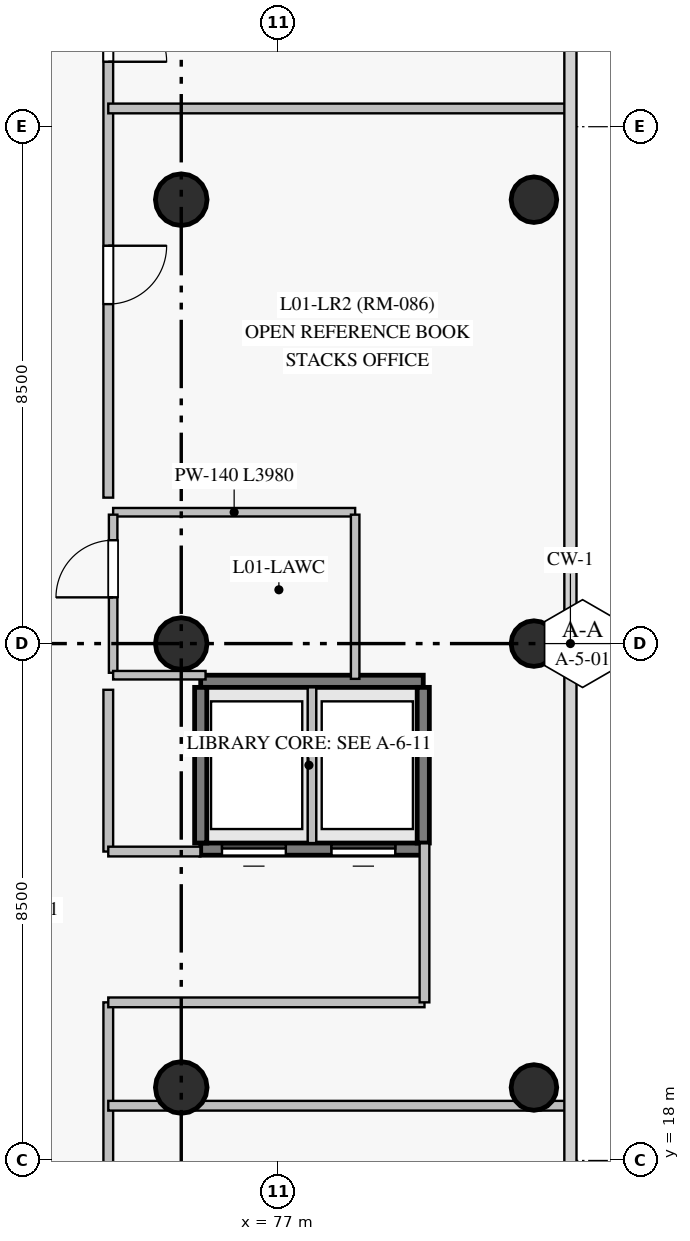
"""IFC4 building model, lengths in metres.
Left out: names, types, materials, properties, quantities, classifications, styles, units other than length and angle.
Written with IfcOpenShell. Run it as: python <this file> out.ifc"""

import sys

from ifc_helpers import new_model, si_unit, direction, frame, frame_2d, origin, origin_with_axes, origin_2d, place, context, subcontext, project, spatial, rectangle, circle, extrude, source, transform, mapped, element, fill, save


model = new_model("IFC4")
c1 = context("Model", 3, precision=1e-05, world=origin(), true_north=direction((0.0, 1.0)))
c2 = subcontext(c1, "Body", "Model", "MODEL_VIEW")
j1 = project(units=[si_unit("LENGTHUNIT", "METRE"), si_unit("PLANEANGLEUNIT", "RADIAN")], contexts=[c1])
p1 = place(None, origin())
s1 = spatial("IfcSite", under=j1, at=p1, CompositionType="ELEMENT")
p2 = place(p1, origin())
s2 = spatial("IfcBuilding", under=s1, at=p2, CompositionType="ELEMENT")
p3 = place(p2, frame((0.0, 0.0, 4.5)))
s3 = spatial("IfcBuildingStorey", under=s2, at=p3, CompositionType="ELEMENT", Elevation=4.5)
m1 = source(origin_with_axes(), c2, "Body", "SweptSolid", [
    extrude(circle(Radius=0.425, at=origin_2d()), origin(), (0.0, 0.0, 1.0), 4.5),
])
for number, where, z_axis, x_axis in (
    (1, (75.4, 19.2, 0.0), (0.0, 0.0, 1.0), (1.0, 0.0, 0.0)),
    (2, (75.4, 26.5, 0.0), (0.0, 0.0, 1.0), (1.0, 0.0, 0.0)),
    (3, (75.4, 33.8, 0.0), (0.0, 0.0, 1.0), (1.0, 0.0, 0.0)),
):
    element("IfcColumn", number, at=place(p3, frame(where, z_axis=z_axis, x_axis=x_axis)), inside=s3, PredefinedType="COLUMN", context=c2, shape_type="MappedRepresentation", body=[
        mapped(m1, transform((0.0, 0.0, 0.0), scale=1.0)),
    ])
m2 = source(origin_with_axes(), c2, "Body", "SweptSolid", [
    extrude(circle(Radius=0.375, at=origin_2d()), origin(), (0.0, 0.0, 1.0), 4.5),
])
for number, where, z_axis, x_axis in (
    (4, (81.2, 19.2, 0.0), (0.0, 0.0, 1.0), (1.0, 0.0, 0.0)),
    (5, (81.2, 26.5, 0.0), (0.0, 0.0, 1.0), (1.0, 0.0, 0.0)),
    (6, (81.2, 33.8, 0.0), (0.0, 0.0, 1.0), (1.0, 0.0, 0.0)),
):
    element("IfcColumn", number, at=place(p3, frame(where, z_axis=z_axis, x_axis=x_axis)), inside=s3, PredefinedType="COLUMN", context=c2, shape_type="MappedRepresentation", body=[
        mapped(m2, transform((0.0, 0.0, 0.0), scale=1.0)),
    ])
p4 = place(p3, frame((75.72, 23.12, 0.0), z_axis=(0.0, 0.0, 1.0), x_axis=(1.0, 0.0, 0.0)))
e7 = element("IfcWall", 7, at=p4, inside=s3, PredefinedType="SHEAR", context=c2, shape_type="SweptSolid", body=[
    extrude(rectangle(XDim=3.66, YDim=0.2, at=frame_2d((1.83, 0.0))), origin(), (0.0, 0.0, 1.0), 4.2),
])
p5 = place(p4, frame((0.35, 0.0, 0.0)))
e8 = element("IfcOpeningElement", 8, at=p5, cuts=e7, PredefinedType="OPENING", context=c2, shape_type="SweptSolid", body=[
    extrude(rectangle(XDim=1.05, YDim=2.15, at=frame_2d((0.525, 1.075))), frame((0.0, 0.11, 0.0), z_axis=(0.0, -1.0, 0.0), x_axis=(1.0, 0.0, 0.0)), (0.0, 0.0, 1.0), 0.22),
])
p6 = place(p4, frame((2.15, 0.0, 0.0)))
e9 = element("IfcOpeningElement", 9, at=p6, cuts=e7, PredefinedType="OPENING", context=c2, shape_type="SweptSolid", body=[
    extrude(rectangle(XDim=1.05, YDim=2.15, at=frame_2d((0.525, 1.075))), frame((0.0, 0.11, 0.0), z_axis=(0.0, -1.0, 0.0), x_axis=(1.0, 0.0, 0.0)), (0.0, 0.0, 1.0), 0.22),
])
p7 = place(p3, frame((75.72, 25.88, 0.0), z_axis=(0.0, 0.0, 1.0), x_axis=(1.0, 0.0, 0.0)))
e10 = element("IfcWall", 10, at=p7, inside=s3, PredefinedType="SHEAR", context=c2, shape_type="SweptSolid", body=[
    extrude(rectangle(XDim=3.66, YDim=0.2, at=frame_2d((1.83, 0.0))), origin(), (0.0, 0.0, 1.0), 4.2),
])
for number, where, z_axis, x_axis in (
    (11, (75.72, 23.22, 0.0), (0.0, 0.0, 1.0), (0.0, 1.0, 0.0)),
    (12, (79.38, 23.22, 0.0), (0.0, 0.0, 1.0), (0.0, 1.0, 0.0)),
):
    element("IfcWall", number, at=place(p3, frame(where, z_axis=z_axis, x_axis=x_axis)), inside=s3, PredefinedType="SHEAR", context=c2, shape_type="SweptSolid", body=[
        extrude(rectangle(XDim=2.56, YDim=0.2, at=frame_2d((1.28, 0.0))), origin(), (0.0, 0.0, 1.0), 4.2),
    ])
p8 = place(p3, frame((74.2, 44.038, 0.0), z_axis=(0.0, 0.0, 1.0), x_axis=(0.0, -1.0, 0.0)))
e13 = element("IfcWall", 13, at=p8, inside=s3, PredefinedType="PARTITIONING", context=c2, shape_type="SweptSolid", body=[
    extrude(rectangle(XDim=15.138, YDim=0.16, at=frame_2d((7.569, 0.0))), origin(), (0.0, 0.0, 1.0), 4.2),
])
p9 = place(p8, frame((10.996, 0.0, 0.0)))
e14 = element("IfcOpeningElement", 14, at=p9, cuts=e13, PredefinedType="OPENING", context=c2, shape_type="SweptSolid", body=[
    extrude(rectangle(XDim=0.96, YDim=2.15, at=frame_2d((0.48, 1.075))), frame((0.0, 0.09, 0.0), z_axis=(0.0, -1.0, 0.0), x_axis=(1.0, 0.0, 0.0)), (0.0, 0.0, 1.0), 0.18),
])
p10 = place(p8, frame((7.01, 0.0, 0.0)))
e15 = element("IfcOpeningElement", 15, at=p10, cuts=e13, PredefinedType="OPENING", context=c2, shape_type="SweptSolid", body=[
    extrude(rectangle(XDim=0.96, YDim=2.15, at=frame_2d((0.48, 1.075))), frame((0.0, 0.09, 0.0), z_axis=(0.0, -1.0, 0.0), x_axis=(1.0, 0.0, 0.0)), (0.0, 0.0, 1.0), 0.18),
])
p11 = place(p3, frame((74.2, 20.6, 0.0), z_axis=(0.0, 0.0, 1.0), x_axis=(0.0, -1.0, 0.0)))
e16 = element("IfcWall", 16, at=p11, inside=s3, PredefinedType="PARTITIONING", context=c2, shape_type="SweptSolid", body=[
    extrude(rectangle(XDim=11.678, YDim=0.16, at=frame_2d((5.839, 0.0))), origin(), (0.0, 0.0, 1.0), 4.2),
])
p12 = place(p11, frame((5.28, 0.0, 0.0)))
e17 = element("IfcOpeningElement", 17, at=p12, cuts=e16, PredefinedType="OPENING", context=c2, shape_type="SweptSolid", body=[
    extrude(rectangle(XDim=0.96, YDim=2.15, at=frame_2d((0.48, 1.075))), frame((0.0, 0.09, 0.0), z_axis=(0.0, -1.0, 0.0), x_axis=(1.0, 0.0, 0.0)), (0.0, 0.0, 1.0), 0.18),
])
p13 = place(p3, frame((74.2, 18.9, 0.0), z_axis=(0.0, 0.0, 1.0), x_axis=(1.0, 0.0, 0.0)))
e18 = element("IfcWall", 18, at=p13, inside=s3, PredefinedType="PARTITIONING", context=c2, shape_type="SweptSolid", body=[
    extrude(rectangle(XDim=7.545, YDim=0.16, at=frame_2d((3.772, 0.0))), origin(), (0.0, 0.0, 1.0), 3.55),
])
p14 = place(p3, frame((74.2, 35.3, 0.0), z_axis=(0.0, 0.0, 1.0), x_axis=(1.0, 0.0, 0.0)))
e19 = element("IfcWall", 19, at=p14, inside=s3, PredefinedType="PARTITIONING", context=c2, shape_type="SweptSolid", body=[
    extrude(rectangle(XDim=7.545, YDim=0.16, at=frame_2d((3.772, 0.0))), origin(), (0.0, 0.0, 1.0), 4.2),
])
p15 = place(p3, frame((79.4, 20.6, 0.0), z_axis=(0.0, 0.0, 1.0), x_axis=(-1.0, 0.0, 0.0)))
e20 = element("IfcWall", 20, at=p15, inside=s3, PredefinedType="PARTITIONING", context=c2, shape_type="SweptSolid", body=[
    extrude(rectangle(XDim=5.2, YDim=0.16, at=frame_2d((2.6, 0.0))), origin(), (0.0, 0.0, 1.0), 4.2),
])
p16 = place(p3, frame((74.28, 28.66, 0.0), z_axis=(0.0, 0.0, 1.0), x_axis=(1.0, 0.0, 0.0)))
e21 = element("IfcWall", 21, at=p16, inside=s3, PredefinedType="PARTITIONING", context=c2, shape_type="SweptSolid", body=[
    extrude(rectangle(XDim=3.98, YDim=0.14, at=frame_2d((1.99, 0.0))), origin(), (0.0, 0.0, 1.0), 4.2),
])
p17 = place(p3, frame((78.26, 25.92, 0.0), z_axis=(0.0, 0.0, 1.0), x_axis=(0.0, 1.0, 0.0)))
e22 = element("IfcWall", 22, at=p17, inside=s3, PredefinedType="PARTITIONING", context=c2, shape_type="SweptSolid", body=[
    extrude(rectangle(XDim=2.7, YDim=0.14, at=frame_2d((1.35, 0.0))), origin(), (0.0, 0.0, 1.0), 4.2),
])
p18 = place(p3, frame((74.2, 25.74, 0.0), z_axis=(0.0, 0.0, 1.0), x_axis=(0.0, -1.0, 0.0)))
e23 = element("IfcWall", 23, at=p18, inside=s3, PredefinedType="PARTITIONING", context=c2, shape_type="SweptSolid", body=[
    extrude(rectangle(XDim=2.66, YDim=0.16, at=frame_2d((1.33, 0.0))), origin(), (0.0, 0.0, 1.0), 4.2),
])
p19 = place(p3, frame((74.28, 26.02, 0.0), z_axis=(0.0, 0.0, 1.0), x_axis=(0.0, 1.0, 0.0)))
e24 = element("IfcWall", 24, at=p19, inside=s3, PredefinedType="PARTITIONING", context=c2, shape_type="SweptSolid", body=[
    extrude(rectangle(XDim=2.6, YDim=0.14, at=frame_2d((1.3, 0.0))), origin(), (0.0, 0.0, 1.0), 4.2),
])
p20 = place(p19, frame((1.24, 0.0, 0.0)))
e25 = element("IfcOpeningElement", 25, at=p20, cuts=e24, PredefinedType="OPENING", context=c2, shape_type="SweptSolid", body=[
    extrude(rectangle(XDim=0.94, YDim=2.1, at=frame_2d((0.47, 1.05))), frame((0.0, 0.08, 0.0), z_axis=(0.0, -1.0, 0.0), x_axis=(1.0, 0.0, 0.0)), (0.0, 0.0, 1.0), 0.16),
])
p21 = place(p3, frame((77.55, 23.22, 0.0), z_axis=(0.0, 0.0, 1.0), x_axis=(0.0, 1.0, 0.0)))
e26 = element("IfcWall", 26, at=p21, inside=s3, PredefinedType="PARTITIONING", context=c2, shape_type="SweptSolid", body=[
    extrude(rectangle(XDim=2.56, YDim=0.14, at=frame_2d((1.28, 0.0))), origin(), (0.0, 0.0, 1.0), 4.2),
])
p22 = place(p3, frame((79.4, 23.215, 0.0), z_axis=(0.0, 0.0, 1.0), x_axis=(0.0, -1.0, 0.0)))
e27 = element("IfcWall", 27, at=p22, inside=s3, PredefinedType="PARTITIONING", context=c2, shape_type="SweptSolid", body=[
    extrude(rectangle(XDim=2.615, YDim=0.16, at=frame_2d((1.308, 0.0))), origin(), (0.0, 0.0, 1.0), 4.2),
])
p23 = place(p3, frame((74.28, 25.98, 0.0), z_axis=(0.0, 0.0, 1.0), x_axis=(1.0, 0.0, 0.0)))
e28 = element("IfcWall", 28, at=p23, inside=s3, PredefinedType="PARTITIONING", context=c2, shape_type="SweptSolid", body=[
    extrude(rectangle(XDim=1.52, YDim=0.14, at=frame_2d((0.76, 0.0))), origin(), (0.0, 0.0, 1.0), 3.55),
])
p24 = place(p3, frame((74.2, 23.08, 0.0), z_axis=(0.0, 0.0, 1.0), x_axis=(1.0, 0.0, 0.0)))
e29 = element("IfcWall", 29, at=p24, inside=s3, PredefinedType="PARTITIONING", context=c2, shape_type="SweptSolid", body=[
    extrude(rectangle(XDim=1.515, YDim=0.16, at=frame_2d((0.758, 0.0))), origin(), (0.0, 0.0, 1.0), 3.7),
])
m3 = source(origin_with_axes(), c2, "Body", "SweptSolid", [
    extrude(rectangle(XDim=1.05, YDim=2.15, at=frame_2d((0.525, 1.075))), frame((0.0, 0.025, 0.0), z_axis=(0.0, -1.0, 0.0), x_axis=(1.0, 0.0, 0.0)), (0.0, 0.0, 1.0), 0.05),
])
p25 = place(p5, origin())
e30 = element("IfcDoor", 30, at=p25, inside=s3, OperationType="SLIDING_TO_LEFT", PredefinedType="DOOR", context=c2, shape_type="MappedRepresentation", body=[
    mapped(m3, transform((0.0, 0.0, 0.0), scale=1.0)),
])
fill(e8, e30)
p26 = place(p6, origin())
e31 = element("IfcDoor", 31, at=p26, inside=s3, OperationType="SLIDING_TO_RIGHT", PredefinedType="DOOR", context=c2, shape_type="MappedRepresentation", body=[
    mapped(m3, transform((0.0, 0.0, 0.0), scale=1.0)),
])
fill(e9, e31)
m4 = source(origin_with_axes(), c2, "Body", "SweptSolid", [
    extrude(rectangle(XDim=0.94, YDim=2.1, at=frame_2d((0.47, 1.05))), frame((0.0, 0.025, 0.0), z_axis=(0.0, -1.0, 0.0), x_axis=(1.0, 0.0, 0.0)), (0.0, 0.0, 1.0), 0.05),
])
p27 = place(p20, origin())
e32 = element("IfcDoor", 32, at=p27, inside=s3, OperationType="SINGLE_SWING_LEFT", PredefinedType="DOOR", context=c2, shape_type="MappedRepresentation", body=[
    mapped(m4, transform((0.0, 0.0, 0.0), scale=1.0)),
])
fill(e25, e32)
m5 = source(origin_with_axes(), c2, "Body", "SweptSolid", [
    extrude(rectangle(XDim=0.96, YDim=2.15, at=frame_2d((0.48, 1.075))), frame((0.0, 0.025, 0.0), z_axis=(0.0, -1.0, 0.0), x_axis=(1.0, 0.0, 0.0)), (0.0, 0.0, 1.0), 0.05),
])
p28 = place(p9, origin())
e33 = element("IfcDoor", 33, at=p28, inside=s3, OperationType="SINGLE_SWING_LEFT", PredefinedType="DOOR", context=c2, shape_type="MappedRepresentation", body=[
    mapped(m5, transform((0.0, 0.0, 0.0), scale=1.0)),
])
fill(e14, e33)
p29 = place(p10, origin())
e34 = element("IfcDoor", 34, at=p29, inside=s3, OperationType="SINGLE_SWING_RIGHT", PredefinedType="DOOR", context=c2, shape_type="MappedRepresentation", body=[
    mapped(m5, transform((0.0, 0.0, 0.0), scale=1.0)),
])
fill(e15, e34)
save(model, sys.argv[1])
